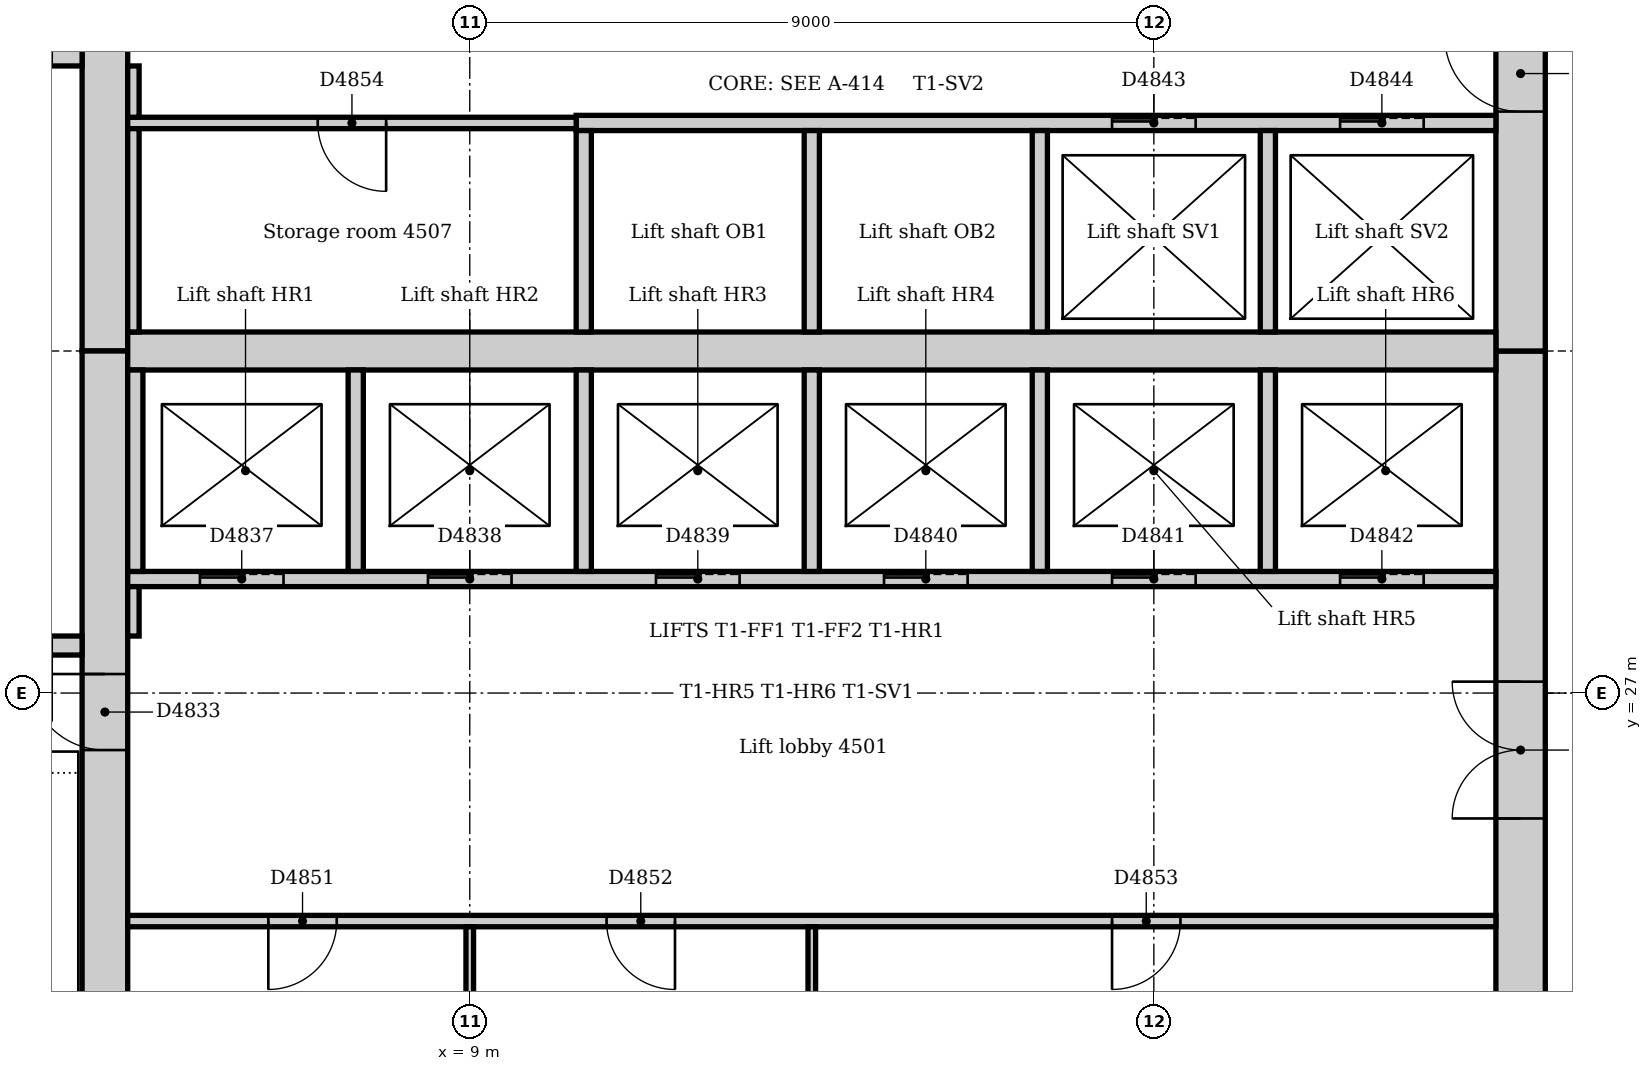
"""IFC4 building model, lengths in metres.
Left out: names, types, materials, properties, quantities, classifications, styles, units other than length and angle.
Written with IfcOpenShell. Run it as: python <this file> out.ifc"""

import sys

from ifc_helpers import new_model, si_unit, direction, frame, frame_2d, origin, place, context, subcontext, project, spatial, rectangle, extrude, element, fill, save


model = new_model("IFC4")
c1 = context("Model", 3, precision=1e-05, world=origin(), true_north=direction((0.0, 1.0)))
c2 = subcontext(c1, "Body", "Model", "MODEL_VIEW")
j1 = project(units=[si_unit("LENGTHUNIT", "METRE"), si_unit("PLANEANGLEUNIT", "RADIAN")], contexts=[c1])
p1 = place(None, origin())
s1 = spatial("IfcSite", under=j1, at=p1, CompositionType="ELEMENT")
p2 = place(p1, origin())
s2 = spatial("IfcBuilding", under=s1, at=p2, CompositionType="ELEMENT")
p3 = place(p2, frame((0.0, 0.0, 189.0)))
s3 = spatial("IfcBuildingStorey", under=s2, at=p3, CompositionType="ELEMENT", Elevation=189.0)
p4 = place(p3, frame((22.825, 21.0, 0.0), z_axis=(0.0, 0.0, 1.0), x_axis=(0.0, 1.0, 0.0)))
e1 = element("IfcWall", 1, at=p4, inside=s3, PredefinedType="SOLIDWALL", context=c2, shape_type="SweptSolid", body=[
    extrude(rectangle(XDim=10.5, YDim=0.65, at=frame_2d((5.25, 0.0))), origin(), (0.0, 0.0, 1.0), 4.0),
])
p5 = place(p4, frame((4.35, 0.0, 0.0)))
e2 = element("IfcOpeningElement", 2, at=p5, cuts=e1, PredefinedType="OPENING", context=c2, shape_type="SweptSolid", body=[
    extrude(rectangle(XDim=1.8, YDim=2.1, at=frame_2d((0.9, 1.05))), frame((0.0, 0.335, 0.0), z_axis=(0.0, -1.0, 0.0), x_axis=(1.0, 0.0, 0.0)), (0.0, 0.0, 1.0), 0.67),
])
p6 = place(p3, frame((22.825, 31.5, 0.0), z_axis=(0.0, 0.0, 1.0), x_axis=(0.0, 1.0, 0.0)))
e3 = element("IfcWall", 3, at=p6, inside=s3, PredefinedType="SOLIDWALL", context=c2, shape_type="SweptSolid", body=[
    extrude(rectangle(XDim=10.5, YDim=0.65, at=frame_2d((5.25, 0.0))), origin(), (0.0, 0.0, 1.0), 4.0),
])
p7 = place(p6, frame((3.15, 0.0, 0.0)))
e4 = element("IfcOpeningElement", 4, at=p7, cuts=e3, PredefinedType="OPENING", context=c2, shape_type="SweptSolid", body=[
    extrude(rectangle(XDim=1.0, YDim=2.1, at=frame_2d((0.5, 1.05))), frame((0.0, 0.335, 0.0), z_axis=(0.0, -1.0, 0.0), x_axis=(1.0, 0.0, 0.0)), (0.0, 0.0, 1.0), 0.67),
])
p8 = place(p6, frame((5.2, 0.0, 0.0)))
e5 = element("IfcOpeningElement", 5, at=p8, cuts=e3, PredefinedType="OPENING", context=c2, shape_type="SweptSolid", body=[
    extrude(rectangle(XDim=1.0, YDim=2.1, at=frame_2d((0.5, 1.05))), frame((0.0, 0.335, 0.0), z_axis=(0.0, -1.0, 0.0), x_axis=(1.0, 0.0, 0.0)), (0.0, 0.0, 1.0), 0.67),
])
p9 = place(p3, frame((4.2, 42.0, 0.0), z_axis=(0.0, 0.0, 1.0), x_axis=(0.0, -1.0, 0.0)))
e6 = element("IfcWall", 6, at=p9, inside=s3, PredefinedType="SOLIDWALL", context=c2, shape_type="SweptSolid", body=[
    extrude(rectangle(XDim=10.5, YDim=0.6, at=frame_2d((5.25, 0.0))), origin(), (0.0, 0.0, 1.0), 4.0),
])
p10 = place(p9, frame((5.3, 0.0, 0.0)))
e7 = element("IfcOpeningElement", 7, at=p10, cuts=e6, PredefinedType="OPENING", context=c2, shape_type="SweptSolid", body=[
    extrude(rectangle(XDim=1.0, YDim=2.1, at=frame_2d((0.5, 1.05))), frame((0.0, 0.31, 0.0), z_axis=(0.0, -1.0, 0.0), x_axis=(1.0, 0.0, 0.0)), (0.0, 0.0, 1.0), 0.62),
])
p11 = place(p3, frame((4.2, 31.5, 0.0), z_axis=(0.0, 0.0, 1.0), x_axis=(0.0, -1.0, 0.0)))
e8 = element("IfcWall", 8, at=p11, inside=s3, PredefinedType="SOLIDWALL", context=c2, shape_type="SweptSolid", body=[
    extrude(rectangle(XDim=10.5, YDim=0.6, at=frame_2d((5.25, 0.0))), origin(), (0.0, 0.0, 1.0), 4.0),
])
p12 = place(p11, frame((4.25, 0.0, 0.0)))
e9 = element("IfcOpeningElement", 9, at=p12, cuts=e8, PredefinedType="OPENING", context=c2, shape_type="SweptSolid", body=[
    extrude(rectangle(XDim=1.0, YDim=2.1, at=frame_2d((0.5, 1.05))), frame((0.0, 0.31, 0.0), z_axis=(0.0, -1.0, 0.0), x_axis=(1.0, 0.0, 0.0)), (0.0, 0.0, 1.0), 0.62),
])
p13 = place(p3, frame((4.5, 31.5, 0.0), z_axis=(0.0, 0.0, 1.0), x_axis=(1.0, 0.0, 0.0)))
e10 = element("IfcWall", 10, at=p13, inside=s3, PredefinedType="SOLIDWALL", context=c2, shape_type="SweptSolid", body=[
    extrude(rectangle(XDim=18.0, YDim=0.5, at=frame_2d((9.0, 0.0))), origin(), (0.0, 0.0, 1.0), 4.0),
])
p14 = place(p3, frame((3.9, 27.625, 0.0), z_axis=(0.0, 0.0, 1.0), x_axis=(-1.0, 0.0, 0.0)))
e11 = element("IfcWall", 11, at=p14, inside=s3, PredefinedType="SOLIDWALL", context=c2, shape_type="SweptSolid", body=[
    extrude(rectangle(XDim=3.54, YDim=0.25, at=frame_2d((1.77, 0.0))), origin(), (0.0, 0.0, 1.0), 4.0),
])
p15 = place(p14, frame((0.4, 0.0, 0.0)))
e12 = element("IfcOpeningElement", 12, at=p15, cuts=e11, PredefinedType="OPENING", context=c2, shape_type="SweptSolid", body=[
    extrude(rectangle(XDim=1.0, YDim=2.1, at=frame_2d((0.5, 1.05))), frame((0.0, 0.135, 0.0), z_axis=(0.0, -1.0, 0.0), x_axis=(1.0, 0.0, 0.0)), (0.0, 0.0, 1.0), 0.27),
])
p16 = place(p3, frame((0.36, 35.375, 0.0), z_axis=(0.0, 0.0, 1.0), x_axis=(1.0, 0.0, 0.0)))
e13 = element("IfcWall", 13, at=p16, inside=s3, PredefinedType="SOLIDWALL", context=c2, shape_type="SweptSolid", body=[
    extrude(rectangle(XDim=3.54, YDim=0.25, at=frame_2d((1.77, 0.0))), origin(), (0.0, 0.0, 1.0), 4.0),
])
p17 = place(p16, frame((2.14, 0.0, 0.0)))
e14 = element("IfcOpeningElement", 14, at=p17, cuts=e13, PredefinedType="OPENING", context=c2, shape_type="SweptSolid", body=[
    extrude(rectangle(XDim=1.0, YDim=2.1, at=frame_2d((0.5, 1.05))), frame((0.0, 0.135, 0.0), z_axis=(0.0, -1.0, 0.0), x_axis=(1.0, 0.0, 0.0)), (0.0, 0.0, 1.0), 0.27),
])
p18 = place(p3, frame((4.5, 28.5, 0.0), z_axis=(0.0, 0.0, 1.0), x_axis=(1.0, 0.0, 0.0)))
e15 = element("IfcWall", 15, at=p18, inside=s3, PredefinedType="PARTITIONING", context=c2, shape_type="SweptSolid", body=[
    extrude(rectangle(XDim=18.0, YDim=0.2, at=frame_2d((9.0, 0.0))), origin(), (0.0, 0.0, 1.0), 3.7),
])
p19 = place(p18, frame((0.95, 0.0, 0.0)))
e16 = element("IfcOpeningElement", 16, at=p19, cuts=e15, PredefinedType="OPENING", context=c2, shape_type="SweptSolid", body=[
    extrude(rectangle(XDim=1.1, YDim=2.1, at=frame_2d((0.55, 1.05))), frame((0.0, 0.11, 0.0), z_axis=(0.0, -1.0, 0.0), x_axis=(1.0, 0.0, 0.0)), (0.0, 0.0, 1.0), 0.22),
])
p20 = place(p18, frame((3.95, 0.0, 0.0)))
e17 = element("IfcOpeningElement", 17, at=p20, cuts=e15, PredefinedType="OPENING", context=c2, shape_type="SweptSolid", body=[
    extrude(rectangle(XDim=1.1, YDim=2.1, at=frame_2d((0.55, 1.05))), frame((0.0, 0.11, 0.0), z_axis=(0.0, -1.0, 0.0), x_axis=(1.0, 0.0, 0.0)), (0.0, 0.0, 1.0), 0.22),
])
p21 = place(p18, frame((6.95, 0.0, 0.0)))
e18 = element("IfcOpeningElement", 18, at=p21, cuts=e15, PredefinedType="OPENING", context=c2, shape_type="SweptSolid", body=[
    extrude(rectangle(XDim=1.1, YDim=2.1, at=frame_2d((0.55, 1.05))), frame((0.0, 0.11, 0.0), z_axis=(0.0, -1.0, 0.0), x_axis=(1.0, 0.0, 0.0)), (0.0, 0.0, 1.0), 0.22),
])
p22 = place(p18, frame((9.95, 0.0, 0.0)))
e19 = element("IfcOpeningElement", 19, at=p22, cuts=e15, PredefinedType="OPENING", context=c2, shape_type="SweptSolid", body=[
    extrude(rectangle(XDim=1.1, YDim=2.1, at=frame_2d((0.55, 1.05))), frame((0.0, 0.11, 0.0), z_axis=(0.0, -1.0, 0.0), x_axis=(1.0, 0.0, 0.0)), (0.0, 0.0, 1.0), 0.22),
])
p23 = place(p18, frame((12.95, 0.0, 0.0)))
e20 = element("IfcOpeningElement", 20, at=p23, cuts=e15, PredefinedType="OPENING", context=c2, shape_type="SweptSolid", body=[
    extrude(rectangle(XDim=1.1, YDim=2.1, at=frame_2d((0.55, 1.05))), frame((0.0, 0.11, 0.0), z_axis=(0.0, -1.0, 0.0), x_axis=(1.0, 0.0, 0.0)), (0.0, 0.0, 1.0), 0.22),
])
p24 = place(p18, frame((15.95, 0.0, 0.0)))
e21 = element("IfcOpeningElement", 21, at=p24, cuts=e15, PredefinedType="OPENING", context=c2, shape_type="SweptSolid", body=[
    extrude(rectangle(XDim=1.1, YDim=2.1, at=frame_2d((0.55, 1.05))), frame((0.0, 0.11, 0.0), z_axis=(0.0, -1.0, 0.0), x_axis=(1.0, 0.0, 0.0)), (0.0, 0.0, 1.0), 0.22),
])
p25 = place(p3, frame((10.4, 34.5, 0.0), z_axis=(0.0, 0.0, 1.0), x_axis=(1.0, 0.0, 0.0)))
e22 = element("IfcWall", 22, at=p25, inside=s3, PredefinedType="PARTITIONING", context=c2, shape_type="SweptSolid", body=[
    extrude(rectangle(XDim=12.1, YDim=0.2, at=frame_2d((6.05, 0.0))), origin(), (0.0, 0.0, 1.0), 3.7),
])
p26 = place(p25, frame((7.05, 0.0, 0.0)))
e23 = element("IfcOpeningElement", 23, at=p26, cuts=e22, PredefinedType="OPENING", context=c2, shape_type="SweptSolid", body=[
    extrude(rectangle(XDim=1.1, YDim=2.1, at=frame_2d((0.55, 1.05))), frame((0.0, 0.11, 0.0), z_axis=(0.0, -1.0, 0.0), x_axis=(1.0, 0.0, 0.0)), (0.0, 0.0, 1.0), 0.22),
])
p27 = place(p25, frame((10.05, 0.0, 0.0)))
e24 = element("IfcOpeningElement", 24, at=p27, cuts=e22, PredefinedType="OPENING", context=c2, shape_type="SweptSolid", body=[
    extrude(rectangle(XDim=1.1, YDim=2.1, at=frame_2d((0.55, 1.05))), frame((0.0, 0.11, 0.0), z_axis=(0.0, -1.0, 0.0), x_axis=(1.0, 0.0, 0.0)), (0.0, 0.0, 1.0), 0.22),
])
for number, where, z_axis, x_axis in (
    (25, (10.5, 28.6, 0.0), (0.0, 0.0, 1.0), (0.0, 1.0, 0.0)),
    (26, (10.5, 31.75, 0.0), (0.0, 0.0, 1.0), (0.0, 1.0, 0.0)),
    (27, (13.5, 28.6, 0.0), (0.0, 0.0, 1.0), (0.0, 1.0, 0.0)),
    (28, (13.5, 31.75, 0.0), (0.0, 0.0, 1.0), (0.0, 1.0, 0.0)),
    (29, (16.5, 28.6, 0.0), (0.0, 0.0, 1.0), (0.0, 1.0, 0.0)),
    (30, (16.5, 31.75, 0.0), (0.0, 0.0, 1.0), (0.0, 1.0, 0.0)),
    (31, (19.5, 28.6, 0.0), (0.0, 0.0, 1.0), (0.0, 1.0, 0.0)),
    (32, (19.5, 31.75, 0.0), (0.0, 0.0, 1.0), (0.0, 1.0, 0.0)),
    (33, (4.6, 28.6, 0.0), (0.0, 0.0, 1.0), (0.0, 1.0, 0.0)),
    (34, (7.5, 28.6, 0.0), (0.0, 0.0, 1.0), (0.0, 1.0, 0.0)),
):
    element("IfcWall", number, at=place(p3, frame(where, z_axis=z_axis, x_axis=x_axis)), inside=s3, PredefinedType="PARTITIONING", context=c2, shape_type="SweptSolid", body=[
        extrude(rectangle(XDim=2.65, YDim=0.2, at=frame_2d((1.325, 0.0))), origin(), (0.0, 0.0, 1.0), 3.7),
    ])
p28 = place(p3, frame((4.5, 24.0, 0.0), z_axis=(0.0, 0.0, 1.0), x_axis=(1.0, 0.0, 0.0)))
e35 = element("IfcWall", 35, at=p28, inside=s3, PredefinedType="PARTITIONING", context=c2, shape_type="SweptSolid", body=[
    extrude(rectangle(XDim=18.0, YDim=0.15, at=frame_2d((9.0, 0.0))), origin(), (0.0, 0.0, 1.0), 3.7),
])
p29 = place(p28, frame((1.85, 0.0, 0.0)))
e36 = element("IfcOpeningElement", 36, at=p29, cuts=e35, PredefinedType="OPENING", context=c2, shape_type="SweptSolid", body=[
    extrude(rectangle(XDim=0.9, YDim=2.1, at=frame_2d((0.45, 1.05))), frame((0.0, 0.085, 0.0), z_axis=(0.0, -1.0, 0.0), x_axis=(1.0, 0.0, 0.0)), (0.0, 0.0, 1.0), 0.17),
])
p30 = place(p28, frame((6.3, 0.0, 0.0)))
e37 = element("IfcOpeningElement", 37, at=p30, cuts=e35, PredefinedType="OPENING", context=c2, shape_type="SweptSolid", body=[
    extrude(rectangle(XDim=0.9, YDim=2.1, at=frame_2d((0.45, 1.05))), frame((0.0, 0.085, 0.0), z_axis=(0.0, -1.0, 0.0), x_axis=(1.0, 0.0, 0.0)), (0.0, 0.0, 1.0), 0.17),
])
p31 = place(p28, frame((12.95, 0.0, 0.0)))
e38 = element("IfcOpeningElement", 38, at=p31, cuts=e35, PredefinedType="OPENING", context=c2, shape_type="SweptSolid", body=[
    extrude(rectangle(XDim=0.9, YDim=2.1, at=frame_2d((0.45, 1.05))), frame((0.0, 0.085, 0.0), z_axis=(0.0, -1.0, 0.0), x_axis=(1.0, 0.0, 0.0)), (0.0, 0.0, 1.0), 0.17),
])
p32 = place(p3, frame((4.5, 34.5, 0.0), z_axis=(0.0, 0.0, 1.0), x_axis=(1.0, 0.0, 0.0)))
e39 = element("IfcWall", 39, at=p32, inside=s3, PredefinedType="PARTITIONING", context=c2, shape_type="SweptSolid", body=[
    extrude(rectangle(XDim=5.9, YDim=0.15, at=frame_2d((2.95, 0.0))), origin(), (0.0, 0.0, 1.0), 3.7),
])
p33 = place(p32, frame((2.5, 0.0, 0.0)))
e40 = element("IfcOpeningElement", 40, at=p33, cuts=e39, PredefinedType="OPENING", context=c2, shape_type="SweptSolid", body=[
    extrude(rectangle(XDim=0.9, YDim=2.1, at=frame_2d((0.45, 1.05))), frame((0.0, 0.085, 0.0), z_axis=(0.0, -1.0, 0.0), x_axis=(1.0, 0.0, 0.0)), (0.0, 0.0, 1.0), 0.17),
])
p34 = place(p3, frame((4.575, 34.575, 0.0), z_axis=(0.0, 0.0, 1.0), x_axis=(0.0, 1.0, 0.0)))
e41 = element("IfcWall", 41, at=p34, inside=s3, PredefinedType="PARTITIONING", context=c2, shape_type="SweptSolid", body=[
    extrude(rectangle(XDim=0.675, YDim=0.15, at=frame_2d((0.338, 0.0))), origin(), (0.0, 0.0, 1.0), 3.7),
])
p35 = place(p3, frame((4.575, 31.75, 0.0), z_axis=(0.0, 0.0, 1.0), x_axis=(0.0, 1.0, 0.0)))
e42 = element("IfcWall", 42, at=p35, inside=s3, PredefinedType="PARTITIONING", context=c2, shape_type="SweptSolid", body=[
    extrude(rectangle(XDim=2.675, YDim=0.15, at=frame_2d((1.337, 0.0))), origin(), (0.0, 0.0, 1.0), 3.7),
])
p36 = place(p3, frame((4.575, 27.75, 0.0), z_axis=(0.0, 0.0, 1.0), x_axis=(0.0, 1.0, 0.0)))
e43 = element("IfcWall", 43, at=p36, inside=s3, PredefinedType="PARTITIONING", context=c2, shape_type="SweptSolid", body=[
    extrude(rectangle(XDim=0.65, YDim=0.15, at=frame_2d((0.325, 0.0))), origin(), (0.0, 0.0, 1.0), 3.7),
])
for number, where, z_axis, x_axis in (
    (44, (9.0, 21.0, 0.0), (0.0, 0.0, 1.0), (0.0, 1.0, 0.0)),
    (45, (13.5, 21.0, 0.0), (0.0, 0.0, 1.0), (0.0, 1.0, 0.0)),
):
    element("IfcWall", number, at=place(p3, frame(where, z_axis=z_axis, x_axis=x_axis)), inside=s3, PredefinedType="PARTITIONING", context=c2, shape_type="SweptSolid", body=[
        extrude(rectangle(XDim=2.925, YDim=0.1, at=frame_2d((1.462, 0.0))), origin(), (0.0, 0.0, 1.0), 3.7),
    ])
p37 = place(p12, frame((1.0, 0.0, 0.0), z_axis=(0.0, 0.0, 1.0), x_axis=(-1.0, 0.0, 0.0)))
e46 = element("IfcDoor", 46, at=p37, inside=s3, OperationType="SINGLE_SWING_RIGHT", PredefinedType="DOOR", context=c2, shape_type="SweptSolid", body=[
    extrude(rectangle(XDim=1.0, YDim=2.1, at=frame_2d((0.5, 1.05))), frame((0.0, 0.025, 0.0), z_axis=(0.0, -1.0, 0.0), x_axis=(1.0, 0.0, 0.0)), (0.0, 0.0, 1.0), 0.05),
])
fill(e9, e46)
p38 = place(p19, origin())
e47 = element("IfcDoor", 47, at=p38, inside=s3, OperationType="SLIDING_TO_LEFT", PredefinedType="DOOR", context=c2, shape_type="SweptSolid", body=[
    extrude(rectangle(XDim=1.1, YDim=2.1, at=frame_2d((0.55, 1.05))), frame((0.0, 0.025, 0.0), z_axis=(0.0, -1.0, 0.0), x_axis=(1.0, 0.0, 0.0)), (0.0, 0.0, 1.0), 0.05),
])
fill(e16, e47)
p39 = place(p20, origin())
e48 = element("IfcDoor", 48, at=p39, inside=s3, OperationType="SLIDING_TO_LEFT", PredefinedType="DOOR", context=c2, shape_type="SweptSolid", body=[
    extrude(rectangle(XDim=1.1, YDim=2.1, at=frame_2d((0.55, 1.05))), frame((0.0, 0.025, 0.0), z_axis=(0.0, -1.0, 0.0), x_axis=(1.0, 0.0, 0.0)), (0.0, 0.0, 1.0), 0.05),
])
fill(e17, e48)
p40 = place(p21, origin())
e49 = element("IfcDoor", 49, at=p40, inside=s3, OperationType="SLIDING_TO_LEFT", PredefinedType="DOOR", context=c2, shape_type="SweptSolid", body=[
    extrude(rectangle(XDim=1.1, YDim=2.1, at=frame_2d((0.55, 1.05))), frame((0.0, 0.025, 0.0), z_axis=(0.0, -1.0, 0.0), x_axis=(1.0, 0.0, 0.0)), (0.0, 0.0, 1.0), 0.05),
])
fill(e18, e49)
p41 = place(p22, origin())
e50 = element("IfcDoor", 50, at=p41, inside=s3, OperationType="SLIDING_TO_LEFT", PredefinedType="DOOR", context=c2, shape_type="SweptSolid", body=[
    extrude(rectangle(XDim=1.1, YDim=2.1, at=frame_2d((0.55, 1.05))), frame((0.0, 0.025, 0.0), z_axis=(0.0, -1.0, 0.0), x_axis=(1.0, 0.0, 0.0)), (0.0, 0.0, 1.0), 0.05),
])
fill(e19, e50)
p42 = place(p23, origin())
e51 = element("IfcDoor", 51, at=p42, inside=s3, OperationType="SLIDING_TO_LEFT", PredefinedType="DOOR", context=c2, shape_type="SweptSolid", body=[
    extrude(rectangle(XDim=1.1, YDim=2.1, at=frame_2d((0.55, 1.05))), frame((0.0, 0.025, 0.0), z_axis=(0.0, -1.0, 0.0), x_axis=(1.0, 0.0, 0.0)), (0.0, 0.0, 1.0), 0.05),
])
fill(e20, e51)
p43 = place(p24, origin())
e52 = element("IfcDoor", 52, at=p43, inside=s3, OperationType="SLIDING_TO_LEFT", PredefinedType="DOOR", context=c2, shape_type="SweptSolid", body=[
    extrude(rectangle(XDim=1.1, YDim=2.1, at=frame_2d((0.55, 1.05))), frame((0.0, 0.025, 0.0), z_axis=(0.0, -1.0, 0.0), x_axis=(1.0, 0.0, 0.0)), (0.0, 0.0, 1.0), 0.05),
])
fill(e21, e52)
p44 = place(p26, origin())
e53 = element("IfcDoor", 53, at=p44, inside=s3, OperationType="SLIDING_TO_LEFT", PredefinedType="DOOR", context=c2, shape_type="SweptSolid", body=[
    extrude(rectangle(XDim=1.1, YDim=2.1, at=frame_2d((0.55, 1.05))), frame((0.0, 0.025, 0.0), z_axis=(0.0, -1.0, 0.0), x_axis=(1.0, 0.0, 0.0)), (0.0, 0.0, 1.0), 0.05),
])
fill(e23, e53)
p45 = place(p27, origin())
e54 = element("IfcDoor", 54, at=p45, inside=s3, OperationType="SLIDING_TO_LEFT", PredefinedType="DOOR", context=c2, shape_type="SweptSolid", body=[
    extrude(rectangle(XDim=1.1, YDim=2.1, at=frame_2d((0.55, 1.05))), frame((0.0, 0.025, 0.0), z_axis=(0.0, -1.0, 0.0), x_axis=(1.0, 0.0, 0.0)), (0.0, 0.0, 1.0), 0.05),
])
fill(e24, e54)
p46 = place(p5, origin())
e55 = element("IfcDoor", 55, at=p46, inside=s3, OperationType="DOUBLE_DOOR_DOUBLE_SWING", PredefinedType="DOOR", context=c2, shape_type="SweptSolid", body=[
    extrude(rectangle(XDim=1.8, YDim=2.1, at=frame_2d((0.9, 1.05))), frame((0.0, 0.025, 0.0), z_axis=(0.0, -1.0, 0.0), x_axis=(1.0, 0.0, 0.0)), (0.0, 0.0, 1.0), 0.05),
])
fill(e2, e55)
p47 = place(p7, origin())
e56 = element("IfcDoor", 56, at=p47, inside=s3, OperationType="SINGLE_SWING_RIGHT", PredefinedType="DOOR", context=c2, shape_type="SweptSolid", body=[
    extrude(rectangle(XDim=1.0, YDim=2.1, at=frame_2d((0.5, 1.05))), frame((0.0, 0.025, 0.0), z_axis=(0.0, -1.0, 0.0), x_axis=(1.0, 0.0, 0.0)), (0.0, 0.0, 1.0), 0.05),
])
fill(e4, e56)
p48 = place(p29, frame((0.9, 0.0, 0.0), z_axis=(0.0, 0.0, 1.0), x_axis=(-1.0, 0.0, 0.0)))
e57 = element("IfcDoor", 57, at=p48, inside=s3, OperationType="SINGLE_SWING_RIGHT", PredefinedType="DOOR", context=c2, shape_type="SweptSolid", body=[
    extrude(rectangle(XDim=0.9, YDim=2.1, at=frame_2d((0.45, 1.05))), frame((0.0, 0.025, 0.0), z_axis=(0.0, -1.0, 0.0), x_axis=(1.0, 0.0, 0.0)), (0.0, 0.0, 1.0), 0.05),
])
fill(e36, e57)
p49 = place(p30, frame((0.9, 0.0, 0.0), z_axis=(0.0, 0.0, 1.0), x_axis=(-1.0, 0.0, 0.0)))
e58 = element("IfcDoor", 58, at=p49, inside=s3, OperationType="SINGLE_SWING_LEFT", PredefinedType="DOOR", context=c2, shape_type="SweptSolid", body=[
    extrude(rectangle(XDim=0.9, YDim=2.1, at=frame_2d((0.45, 1.05))), frame((0.0, 0.025, 0.0), z_axis=(0.0, -1.0, 0.0), x_axis=(1.0, 0.0, 0.0)), (0.0, 0.0, 1.0), 0.05),
])
fill(e37, e58)
p50 = place(p31, frame((0.9, 0.0, 0.0), z_axis=(0.0, 0.0, 1.0), x_axis=(-1.0, 0.0, 0.0)))
e59 = element("IfcDoor", 59, at=p50, inside=s3, OperationType="SINGLE_SWING_RIGHT", PredefinedType="DOOR", context=c2, shape_type="SweptSolid", body=[
    extrude(rectangle(XDim=0.9, YDim=2.1, at=frame_2d((0.45, 1.05))), frame((0.0, 0.025, 0.0), z_axis=(0.0, -1.0, 0.0), x_axis=(1.0, 0.0, 0.0)), (0.0, 0.0, 1.0), 0.05),
])
fill(e38, e59)
p51 = place(p33, frame((0.9, 0.0, 0.0), z_axis=(0.0, 0.0, 1.0), x_axis=(-1.0, 0.0, 0.0)))
e60 = element("IfcDoor", 60, at=p51, inside=s3, OperationType="SINGLE_SWING_LEFT", PredefinedType="DOOR", context=c2, shape_type="SweptSolid", body=[
    extrude(rectangle(XDim=0.9, YDim=2.1, at=frame_2d((0.45, 1.05))), frame((0.0, 0.025, 0.0), z_axis=(0.0, -1.0, 0.0), x_axis=(1.0, 0.0, 0.0)), (0.0, 0.0, 1.0), 0.05),
])
fill(e40, e60)
save(model, sys.argv[1])
